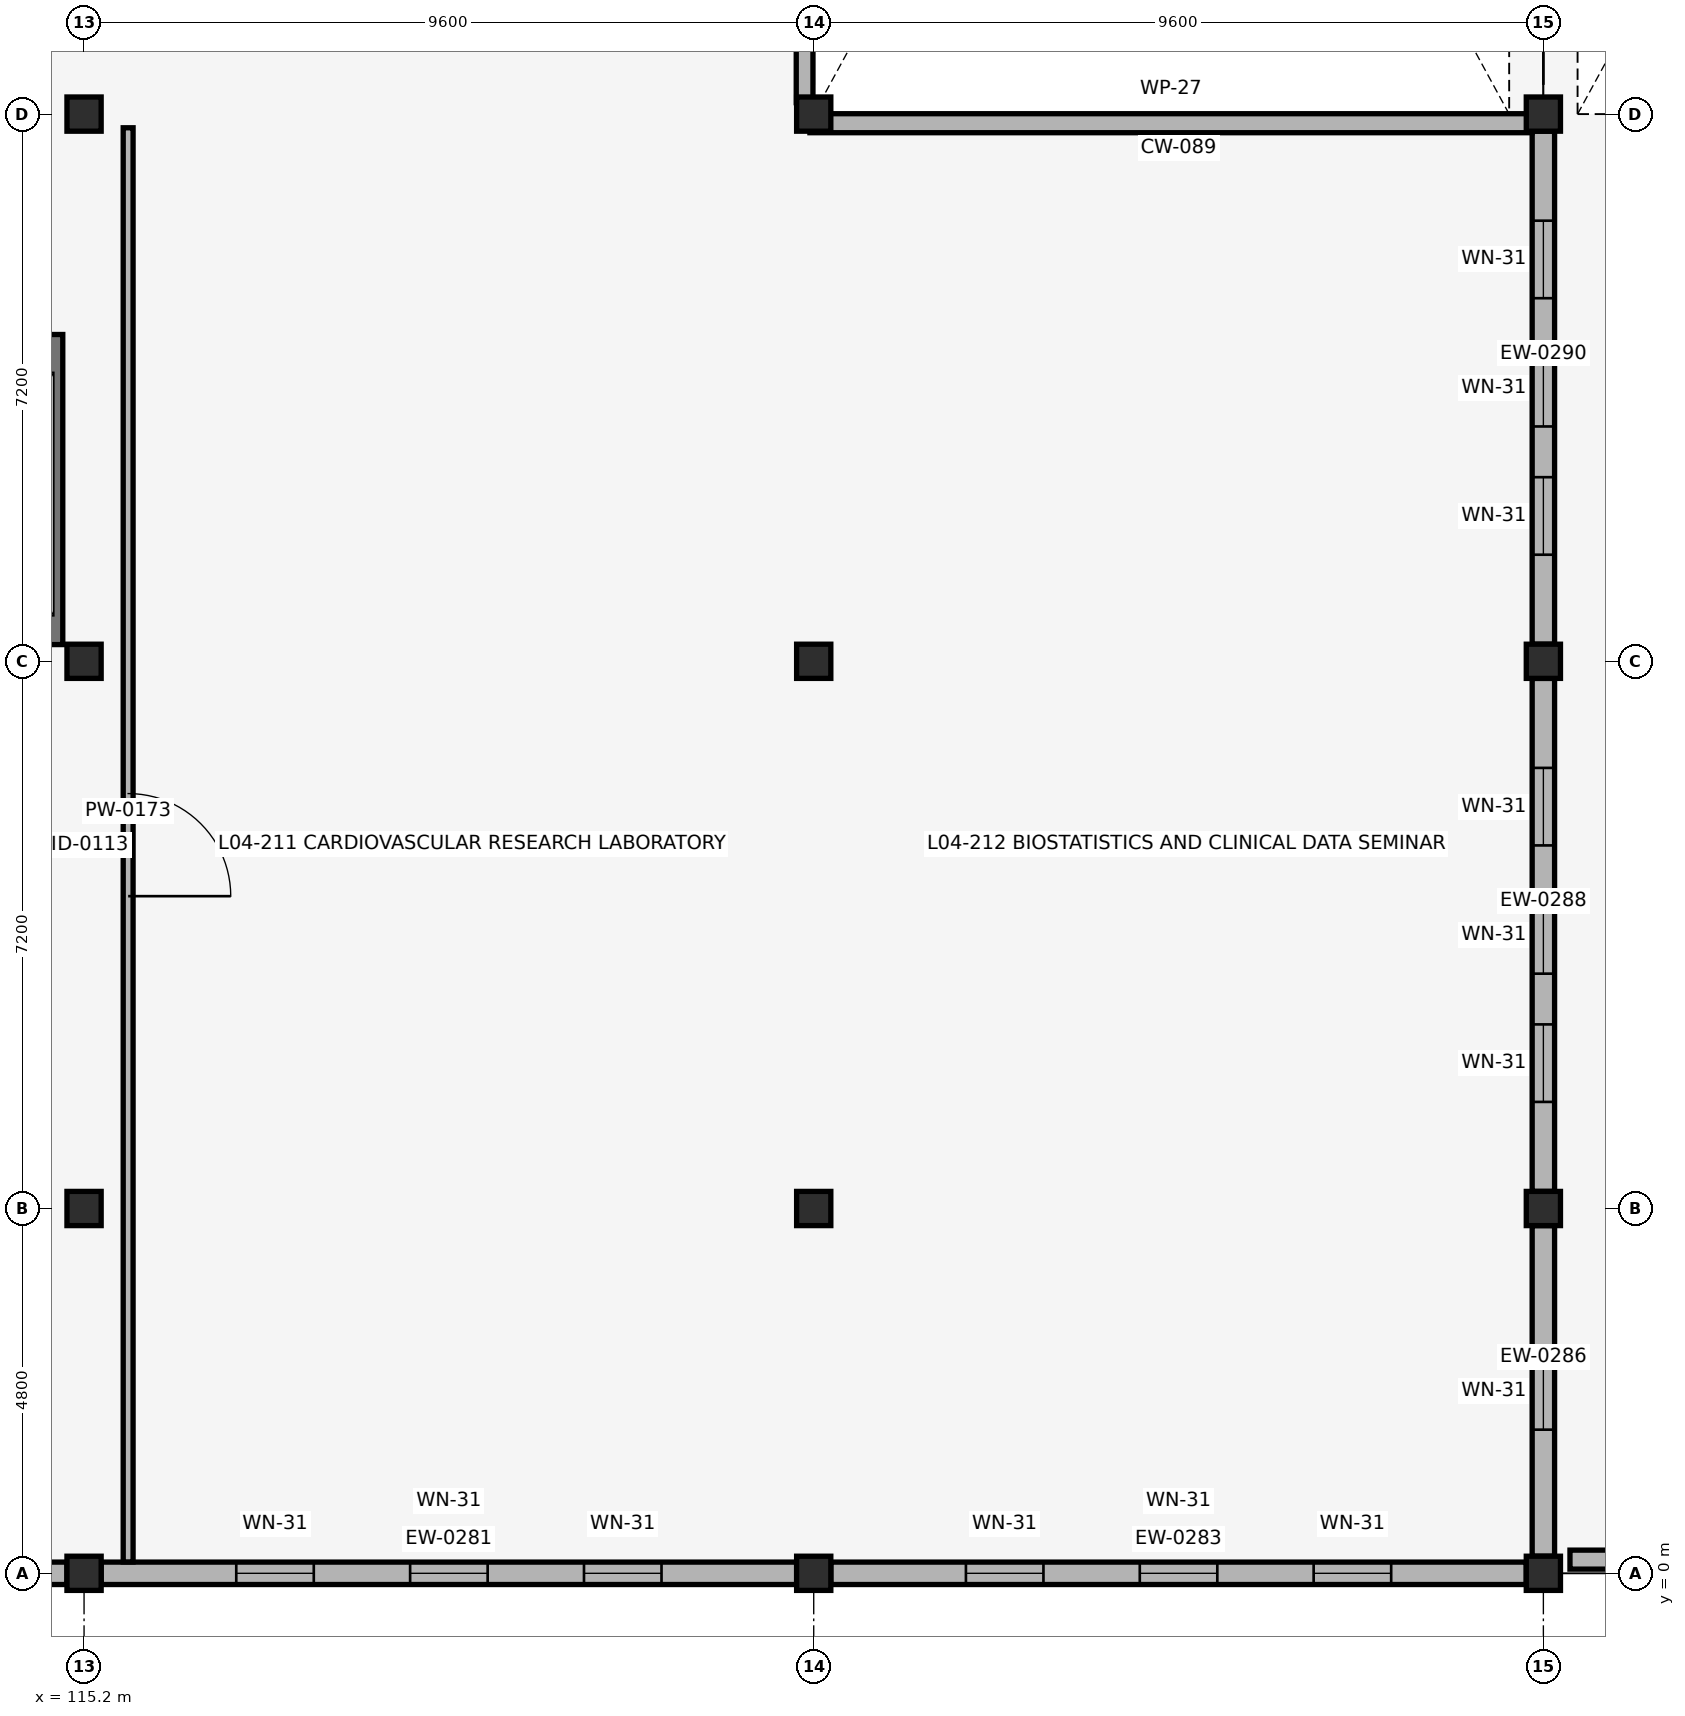
"""IFC4 building model, lengths in metres.
Left out: names, types, materials, properties, quantities, classifications, styles, units other than length and angle.
Written with IfcOpenShell. Run it as: python <this file> out.ifc"""

import sys

from ifc_helpers import new_model, si_unit, direction, frame, frame_2d, origin, origin_2d, place, context, subcontext, project, spatial, rectangle, extrude, element, fill, save


model = new_model("IFC4")
c1 = context("Model", 3, precision=1e-05, world=origin(), true_north=direction((0.0, 1.0)))
c2 = subcontext(c1, "Body", "Model", "MODEL_VIEW")
j1 = project(units=[si_unit("LENGTHUNIT", "METRE"), si_unit("PLANEANGLEUNIT", "RADIAN")], contexts=[c1])
p1 = place(None, origin())
s1 = spatial("IfcSite", under=j1, at=p1, CompositionType="ELEMENT")
p2 = place(p1, origin())
s2 = spatial("IfcBuilding", under=s1, at=p2, CompositionType="ELEMENT")
p3 = place(p2, frame((0.0, 0.0, 16.66)))
s3 = spatial("IfcBuildingStorey", under=s2, at=p3, CompositionType="ELEMENT", Elevation=16.66)
for number, where, z_axis, x_axis in (
    (1, (115.2, 0.0, 0.0), (0.0, 0.0, 1.0), (1.0, 0.0, 0.0)),
    (2, (115.2, 4.8, 0.0), (0.0, 0.0, 1.0), (1.0, 0.0, 0.0)),
    (3, (115.2, 12.0, 0.0), (0.0, 0.0, 1.0), (1.0, 0.0, 0.0)),
    (4, (115.2, 19.2, 0.0), (0.0, 0.0, 1.0), (1.0, 0.0, 0.0)),
    (5, (124.8, 0.0, 0.0), (0.0, 0.0, 1.0), (1.0, 0.0, 0.0)),
    (6, (124.8, 4.8, 0.0), (0.0, 0.0, 1.0), (1.0, 0.0, 0.0)),
    (7, (124.8, 12.0, 0.0), (0.0, 0.0, 1.0), (1.0, 0.0, 0.0)),
    (8, (124.8, 19.2, 0.0), (0.0, 0.0, 1.0), (1.0, 0.0, 0.0)),
    (9, (134.4, 0.0, 0.0), (0.0, 0.0, 1.0), (1.0, 0.0, 0.0)),
    (10, (134.4, 4.8, 0.0), (0.0, 0.0, 1.0), (1.0, 0.0, 0.0)),
    (11, (134.4, 12.0, 0.0), (0.0, 0.0, 1.0), (1.0, 0.0, 0.0)),
    (12, (134.4, 19.2, 0.0), (0.0, 0.0, 1.0), (1.0, 0.0, 0.0)),
):
    element("IfcColumn", number, at=place(p3, frame(where, z_axis=z_axis, x_axis=x_axis)), inside=s3, PredefinedType="COLUMN", context=c2, shape_type="SweptSolid", body=[
        extrude(rectangle(XDim=0.45, YDim=0.45, at=origin_2d()), origin(), (0.0, 0.0, 1.0), 4.08),
    ])
p4 = place(p3, frame((105.825, 0.0, 0.0), z_axis=(0.0, 0.0, 1.0), x_axis=(1.0, 0.0, 0.0)))
e13 = element("IfcWall", 13, at=p4, inside=s3, PredefinedType="SOLIDWALL", context=c2, shape_type="SweptSolid", body=[
    extrude(rectangle(XDim=9.15, YDim=0.295, at=frame_2d((4.575, 0.0))), origin(), (0.0, 0.0, 1.0), 3.06),
])
p5 = place(p4, frame((1.778, 0.0, 0.88)))
e14 = element("IfcOpeningElement", 14, at=p5, cuts=e13, PredefinedType="OPENING", context=c2, shape_type="SweptSolid", body=[
    extrude(rectangle(XDim=1.02, YDim=1.88, at=frame_2d((0.51, 0.94))), frame((0.0, 0.157, 0.0), z_axis=(0.0, -1.0, 0.0), x_axis=(1.0, 0.0, 0.0)), (0.0, 0.0, 1.0), 0.315),
])
p6 = place(p4, frame((4.065, 0.0, 0.88)))
e15 = element("IfcOpeningElement", 15, at=p6, cuts=e13, PredefinedType="OPENING", context=c2, shape_type="SweptSolid", body=[
    extrude(rectangle(XDim=1.02, YDim=1.88, at=frame_2d((0.51, 0.94))), frame((0.0, 0.157, 0.0), z_axis=(0.0, -1.0, 0.0), x_axis=(1.0, 0.0, 0.0)), (0.0, 0.0, 1.0), 0.315),
])
p7 = place(p4, frame((6.353, 0.0, 0.88)))
e16 = element("IfcOpeningElement", 16, at=p7, cuts=e13, PredefinedType="OPENING", context=c2, shape_type="SweptSolid", body=[
    extrude(rectangle(XDim=1.02, YDim=1.88, at=frame_2d((0.51, 0.94))), frame((0.0, 0.157, 0.0), z_axis=(0.0, -1.0, 0.0), x_axis=(1.0, 0.0, 0.0)), (0.0, 0.0, 1.0), 0.315),
])
p8 = place(p3, frame((115.425, 0.0, 0.0), z_axis=(0.0, 0.0, 1.0), x_axis=(1.0, 0.0, 0.0)))
e17 = element("IfcWall", 17, at=p8, inside=s3, PredefinedType="SOLIDWALL", context=c2, shape_type="SweptSolid", body=[
    extrude(rectangle(XDim=9.15, YDim=0.295, at=frame_2d((4.575, 0.0))), origin(), (0.0, 0.0, 1.0), 3.06),
])
p9 = place(p8, frame((1.778, 0.0, 0.88)))
e18 = element("IfcOpeningElement", 18, at=p9, cuts=e17, PredefinedType="OPENING", context=c2, shape_type="SweptSolid", body=[
    extrude(rectangle(XDim=1.02, YDim=1.88, at=frame_2d((0.51, 0.94))), frame((0.0, 0.157, 0.0), z_axis=(0.0, -1.0, 0.0), x_axis=(1.0, 0.0, 0.0)), (0.0, 0.0, 1.0), 0.315),
])
p10 = place(p8, frame((4.065, 0.0, 0.88)))
e19 = element("IfcOpeningElement", 19, at=p10, cuts=e17, PredefinedType="OPENING", context=c2, shape_type="SweptSolid", body=[
    extrude(rectangle(XDim=1.02, YDim=1.88, at=frame_2d((0.51, 0.94))), frame((0.0, 0.157, 0.0), z_axis=(0.0, -1.0, 0.0), x_axis=(1.0, 0.0, 0.0)), (0.0, 0.0, 1.0), 0.315),
])
p11 = place(p8, frame((6.353, 0.0, 0.88)))
e20 = element("IfcOpeningElement", 20, at=p11, cuts=e17, PredefinedType="OPENING", context=c2, shape_type="SweptSolid", body=[
    extrude(rectangle(XDim=1.02, YDim=1.88, at=frame_2d((0.51, 0.94))), frame((0.0, 0.157, 0.0), z_axis=(0.0, -1.0, 0.0), x_axis=(1.0, 0.0, 0.0)), (0.0, 0.0, 1.0), 0.315),
])
p12 = place(p3, frame((125.025, 0.0, 0.0), z_axis=(0.0, 0.0, 1.0), x_axis=(1.0, 0.0, 0.0)))
e21 = element("IfcWall", 21, at=p12, inside=s3, PredefinedType="SOLIDWALL", context=c2, shape_type="SweptSolid", body=[
    extrude(rectangle(XDim=9.15, YDim=0.295, at=frame_2d((4.575, 0.0))), origin(), (0.0, 0.0, 1.0), 3.06),
])
p13 = place(p12, frame((1.778, 0.0, 0.88)))
e22 = element("IfcOpeningElement", 22, at=p13, cuts=e21, PredefinedType="OPENING", context=c2, shape_type="SweptSolid", body=[
    extrude(rectangle(XDim=1.02, YDim=1.88, at=frame_2d((0.51, 0.94))), frame((0.0, 0.157, 0.0), z_axis=(0.0, -1.0, 0.0), x_axis=(1.0, 0.0, 0.0)), (0.0, 0.0, 1.0), 0.315),
])
p14 = place(p12, frame((4.065, 0.0, 0.88)))
e23 = element("IfcOpeningElement", 23, at=p14, cuts=e21, PredefinedType="OPENING", context=c2, shape_type="SweptSolid", body=[
    extrude(rectangle(XDim=1.02, YDim=1.88, at=frame_2d((0.51, 0.94))), frame((0.0, 0.157, 0.0), z_axis=(0.0, -1.0, 0.0), x_axis=(1.0, 0.0, 0.0)), (0.0, 0.0, 1.0), 0.315),
])
p15 = place(p12, frame((6.353, 0.0, 0.88)))
e24 = element("IfcOpeningElement", 24, at=p15, cuts=e21, PredefinedType="OPENING", context=c2, shape_type="SweptSolid", body=[
    extrude(rectangle(XDim=1.02, YDim=1.88, at=frame_2d((0.51, 0.94))), frame((0.0, 0.157, 0.0), z_axis=(0.0, -1.0, 0.0), x_axis=(1.0, 0.0, 0.0)), (0.0, 0.0, 1.0), 0.315),
])
p16 = place(p3, frame((134.4, 0.225, 0.0), z_axis=(0.0, 0.0, 1.0), x_axis=(0.0, 1.0, 0.0)))
e25 = element("IfcWall", 25, at=p16, inside=s3, PredefinedType="SOLIDWALL", context=c2, shape_type="SweptSolid", body=[
    extrude(rectangle(XDim=4.35, YDim=0.295, at=frame_2d((2.175, 0.0))), origin(), (0.0, 0.0, 1.0), 3.06),
])
p17 = place(p16, frame((1.665, 0.0, 0.88)))
e26 = element("IfcOpeningElement", 26, at=p17, cuts=e25, PredefinedType="OPENING", context=c2, shape_type="SweptSolid", body=[
    extrude(rectangle(XDim=1.02, YDim=1.88, at=frame_2d((0.51, 0.94))), frame((0.0, 0.157, 0.0), z_axis=(0.0, -1.0, 0.0), x_axis=(1.0, 0.0, 0.0)), (0.0, 0.0, 1.0), 0.315),
])
p18 = place(p3, frame((134.4, 5.025, 0.0), z_axis=(0.0, 0.0, 1.0), x_axis=(0.0, 1.0, 0.0)))
e27 = element("IfcWall", 27, at=p18, inside=s3, PredefinedType="SOLIDWALL", context=c2, shape_type="SweptSolid", body=[
    extrude(rectangle(XDim=6.75, YDim=0.295, at=frame_2d((3.375, 0.0))), origin(), (0.0, 0.0, 1.0), 3.06),
])
p19 = place(p18, frame((1.177, 0.0, 0.88)))
e28 = element("IfcOpeningElement", 28, at=p19, cuts=e27, PredefinedType="OPENING", context=c2, shape_type="SweptSolid", body=[
    extrude(rectangle(XDim=1.02, YDim=1.88, at=frame_2d((0.51, 0.94))), frame((0.0, 0.157, 0.0), z_axis=(0.0, -1.0, 0.0), x_axis=(1.0, 0.0, 0.0)), (0.0, 0.0, 1.0), 0.315),
])
p20 = place(p18, frame((2.865, 0.0, 0.88)))
e29 = element("IfcOpeningElement", 29, at=p20, cuts=e27, PredefinedType="OPENING", context=c2, shape_type="SweptSolid", body=[
    extrude(rectangle(XDim=1.02, YDim=1.88, at=frame_2d((0.51, 0.94))), frame((0.0, 0.157, 0.0), z_axis=(0.0, -1.0, 0.0), x_axis=(1.0, 0.0, 0.0)), (0.0, 0.0, 1.0), 0.315),
])
p21 = place(p18, frame((4.552, 0.0, 0.88)))
e30 = element("IfcOpeningElement", 30, at=p21, cuts=e27, PredefinedType="OPENING", context=c2, shape_type="SweptSolid", body=[
    extrude(rectangle(XDim=1.02, YDim=1.88, at=frame_2d((0.51, 0.94))), frame((0.0, 0.157, 0.0), z_axis=(0.0, -1.0, 0.0), x_axis=(1.0, 0.0, 0.0)), (0.0, 0.0, 1.0), 0.315),
])
p22 = place(p3, frame((134.4, 12.225, 0.0), z_axis=(0.0, 0.0, 1.0), x_axis=(0.0, 1.0, 0.0)))
e31 = element("IfcWall", 31, at=p22, inside=s3, PredefinedType="SOLIDWALL", context=c2, shape_type="SweptSolid", body=[
    extrude(rectangle(XDim=6.75, YDim=0.295, at=frame_2d((3.375, 0.0))), origin(), (0.0, 0.0, 1.0), 3.06),
])
p23 = place(p22, frame((1.177, 0.0, 0.88)))
e32 = element("IfcOpeningElement", 32, at=p23, cuts=e31, PredefinedType="OPENING", context=c2, shape_type="SweptSolid", body=[
    extrude(rectangle(XDim=1.02, YDim=1.88, at=frame_2d((0.51, 0.94))), frame((0.0, 0.157, 0.0), z_axis=(0.0, -1.0, 0.0), x_axis=(1.0, 0.0, 0.0)), (0.0, 0.0, 1.0), 0.315),
])
p24 = place(p22, frame((2.865, 0.0, 0.88)))
e33 = element("IfcOpeningElement", 33, at=p24, cuts=e31, PredefinedType="OPENING", context=c2, shape_type="SweptSolid", body=[
    extrude(rectangle(XDim=1.02, YDim=1.88, at=frame_2d((0.51, 0.94))), frame((0.0, 0.157, 0.0), z_axis=(0.0, -1.0, 0.0), x_axis=(1.0, 0.0, 0.0)), (0.0, 0.0, 1.0), 0.315),
])
p25 = place(p22, frame((4.552, 0.0, 0.88)))
e34 = element("IfcOpeningElement", 34, at=p25, cuts=e31, PredefinedType="OPENING", context=c2, shape_type="SweptSolid", body=[
    extrude(rectangle(XDim=1.02, YDim=1.88, at=frame_2d((0.51, 0.94))), frame((0.0, 0.157, 0.0), z_axis=(0.0, -1.0, 0.0), x_axis=(1.0, 0.0, 0.0)), (0.0, 0.0, 1.0), 0.315),
])
p26 = place(p3, frame((134.75, 0.18, 0.0), z_axis=(0.0, 0.0, 1.0), x_axis=(1.0, 0.0, 0.0)))
e35 = element("IfcWall", 35, at=p26, inside=s3, PredefinedType="PARAPET", context=c2, shape_type="SweptSolid", body=[
    extrude(rectangle(XDim=18.5, YDim=0.25, at=frame_2d((9.25, 0.0))), origin(), (0.0, 0.0, 1.0), 1.12),
])
p27 = place(p3, frame((124.68, 19.35, 0.0), z_axis=(0.0, 0.0, 1.0), x_axis=(0.0, 1.0, 0.0)))
e36 = element("IfcWall", 36, at=p27, inside=s3, PredefinedType="PARAPET", context=c2, shape_type="SweptSolid", body=[
    extrude(rectangle(XDim=16.6, YDim=0.22, at=frame_2d((8.3, 0.0))), origin(), (0.0, 0.0, 1.0), 1.12),
])
p28 = place(p3, frame((124.75, 19.08, 0.0), z_axis=(0.0, 0.0, 1.0), x_axis=(1.0, 0.0, 0.0)))
e37 = element("IfcWall", 37, at=p28, inside=s3, PredefinedType="PARAPET", context=c2, shape_type="SweptSolid", body=[
    extrude(rectangle(XDim=9.5, YDim=0.25, at=frame_2d((4.75, 0.0))), origin(), (0.0, 0.0, 1.0), 1.12),
])
p29 = place(p3, frame((114.78, 12.22, 0.0), z_axis=(0.0, 0.0, 1.0), x_axis=(0.0, 1.0, 0.0)))
e38 = element("IfcWall", 38, at=p29, inside=s3, PredefinedType="SHEAR", context=c2, shape_type="SweptSolid", body=[
    extrude(rectangle(XDim=4.08, YDim=0.28, at=frame_2d((2.04, 0.0))), origin(), (0.0, 0.0, 1.0), 3.78),
])
p30 = place(p3, frame((115.78, 0.149, 0.0), z_axis=(0.0, 0.0, 1.0), x_axis=(0.0, 1.0, 0.0)))
e39 = element("IfcWall", 39, at=p30, inside=s3, PredefinedType="PARTITIONING", context=c2, shape_type="SweptSolid", body=[
    extrude(rectangle(XDim=18.871, YDim=0.13, at=frame_2d((9.435, 0.0))), origin(), (0.0, 0.0, 1.0), 3.09),
])
p31 = place(p30, frame((8.76, 0.0, 0.0)))
e40 = element("IfcOpeningElement", 40, at=p31, cuts=e39, PredefinedType="OPENING", context=c2, shape_type="SweptSolid", body=[
    extrude(rectangle(XDim=1.35, YDim=2.12, at=frame_2d((0.675, 1.06))), frame((0.0, 0.075, 0.0), z_axis=(0.0, -1.0, 0.0), x_axis=(1.0, 0.0, 0.0)), (0.0, 0.0, 1.0), 0.15),
])
p32 = place(p9, origin())
e41 = element("IfcWindow", 41, at=p32, inside=s3, PartitioningType="SINGLE_PANEL", PredefinedType="WINDOW", context=c2, shape_type="SweptSolid", body=[
    extrude(rectangle(XDim=1.02, YDim=1.88, at=frame_2d((0.51, 0.94))), frame((0.0, 0.03, 0.0), z_axis=(0.0, -1.0, 0.0), x_axis=(1.0, 0.0, 0.0)), (0.0, 0.0, 1.0), 0.06),
])
fill(e18, e41)
p33 = place(p10, origin())
e42 = element("IfcWindow", 42, at=p33, inside=s3, PartitioningType="SINGLE_PANEL", PredefinedType="WINDOW", context=c2, shape_type="SweptSolid", body=[
    extrude(rectangle(XDim=1.02, YDim=1.88, at=frame_2d((0.51, 0.94))), frame((0.0, 0.03, 0.0), z_axis=(0.0, -1.0, 0.0), x_axis=(1.0, 0.0, 0.0)), (0.0, 0.0, 1.0), 0.06),
])
fill(e19, e42)
p34 = place(p11, origin())
e43 = element("IfcWindow", 43, at=p34, inside=s3, PartitioningType="SINGLE_PANEL", PredefinedType="WINDOW", context=c2, shape_type="SweptSolid", body=[
    extrude(rectangle(XDim=1.02, YDim=1.88, at=frame_2d((0.51, 0.94))), frame((0.0, 0.03, 0.0), z_axis=(0.0, -1.0, 0.0), x_axis=(1.0, 0.0, 0.0)), (0.0, 0.0, 1.0), 0.06),
])
fill(e20, e43)
p35 = place(p13, origin())
e44 = element("IfcWindow", 44, at=p35, inside=s3, PartitioningType="SINGLE_PANEL", PredefinedType="WINDOW", context=c2, shape_type="SweptSolid", body=[
    extrude(rectangle(XDim=1.02, YDim=1.88, at=frame_2d((0.51, 0.94))), frame((0.0, 0.03, 0.0), z_axis=(0.0, -1.0, 0.0), x_axis=(1.0, 0.0, 0.0)), (0.0, 0.0, 1.0), 0.06),
])
fill(e22, e44)
p36 = place(p14, origin())
e45 = element("IfcWindow", 45, at=p36, inside=s3, PartitioningType="SINGLE_PANEL", PredefinedType="WINDOW", context=c2, shape_type="SweptSolid", body=[
    extrude(rectangle(XDim=1.02, YDim=1.88, at=frame_2d((0.51, 0.94))), frame((0.0, 0.03, 0.0), z_axis=(0.0, -1.0, 0.0), x_axis=(1.0, 0.0, 0.0)), (0.0, 0.0, 1.0), 0.06),
])
fill(e23, e45)
p37 = place(p15, origin())
e46 = element("IfcWindow", 46, at=p37, inside=s3, PartitioningType="SINGLE_PANEL", PredefinedType="WINDOW", context=c2, shape_type="SweptSolid", body=[
    extrude(rectangle(XDim=1.02, YDim=1.88, at=frame_2d((0.51, 0.94))), frame((0.0, 0.03, 0.0), z_axis=(0.0, -1.0, 0.0), x_axis=(1.0, 0.0, 0.0)), (0.0, 0.0, 1.0), 0.06),
])
fill(e24, e46)
p38 = place(p17, origin())
e47 = element("IfcWindow", 47, at=p38, inside=s3, PartitioningType="SINGLE_PANEL", PredefinedType="WINDOW", context=c2, shape_type="SweptSolid", body=[
    extrude(rectangle(XDim=1.02, YDim=1.88, at=frame_2d((0.51, 0.94))), frame((0.0, 0.03, 0.0), z_axis=(0.0, -1.0, 0.0), x_axis=(1.0, 0.0, 0.0)), (0.0, 0.0, 1.0), 0.06),
])
fill(e26, e47)
p39 = place(p19, origin())
e48 = element("IfcWindow", 48, at=p39, inside=s3, PartitioningType="SINGLE_PANEL", PredefinedType="WINDOW", context=c2, shape_type="SweptSolid", body=[
    extrude(rectangle(XDim=1.02, YDim=1.88, at=frame_2d((0.51, 0.94))), frame((0.0, 0.03, 0.0), z_axis=(0.0, -1.0, 0.0), x_axis=(1.0, 0.0, 0.0)), (0.0, 0.0, 1.0), 0.06),
])
fill(e28, e48)
p40 = place(p20, origin())
e49 = element("IfcWindow", 49, at=p40, inside=s3, PartitioningType="SINGLE_PANEL", PredefinedType="WINDOW", context=c2, shape_type="SweptSolid", body=[
    extrude(rectangle(XDim=1.02, YDim=1.88, at=frame_2d((0.51, 0.94))), frame((0.0, 0.03, 0.0), z_axis=(0.0, -1.0, 0.0), x_axis=(1.0, 0.0, 0.0)), (0.0, 0.0, 1.0), 0.06),
])
fill(e29, e49)
p41 = place(p21, origin())
e50 = element("IfcWindow", 50, at=p41, inside=s3, PartitioningType="SINGLE_PANEL", PredefinedType="WINDOW", context=c2, shape_type="SweptSolid", body=[
    extrude(rectangle(XDim=1.02, YDim=1.88, at=frame_2d((0.51, 0.94))), frame((0.0, 0.03, 0.0), z_axis=(0.0, -1.0, 0.0), x_axis=(1.0, 0.0, 0.0)), (0.0, 0.0, 1.0), 0.06),
])
fill(e30, e50)
p42 = place(p23, origin())
e51 = element("IfcWindow", 51, at=p42, inside=s3, PartitioningType="SINGLE_PANEL", PredefinedType="WINDOW", context=c2, shape_type="SweptSolid", body=[
    extrude(rectangle(XDim=1.02, YDim=1.88, at=frame_2d((0.51, 0.94))), frame((0.0, 0.03, 0.0), z_axis=(0.0, -1.0, 0.0), x_axis=(1.0, 0.0, 0.0)), (0.0, 0.0, 1.0), 0.06),
])
fill(e32, e51)
p43 = place(p24, origin())
e52 = element("IfcWindow", 52, at=p43, inside=s3, PartitioningType="SINGLE_PANEL", PredefinedType="WINDOW", context=c2, shape_type="SweptSolid", body=[
    extrude(rectangle(XDim=1.02, YDim=1.88, at=frame_2d((0.51, 0.94))), frame((0.0, 0.03, 0.0), z_axis=(0.0, -1.0, 0.0), x_axis=(1.0, 0.0, 0.0)), (0.0, 0.0, 1.0), 0.06),
])
fill(e33, e52)
p44 = place(p25, origin())
e53 = element("IfcWindow", 53, at=p44, inside=s3, PartitioningType="SINGLE_PANEL", PredefinedType="WINDOW", context=c2, shape_type="SweptSolid", body=[
    extrude(rectangle(XDim=1.02, YDim=1.88, at=frame_2d((0.51, 0.94))), frame((0.0, 0.03, 0.0), z_axis=(0.0, -1.0, 0.0), x_axis=(1.0, 0.0, 0.0)), (0.0, 0.0, 1.0), 0.06),
])
fill(e34, e53)
p45 = place(p31, origin())
e54 = element("IfcDoor", 54, at=p45, inside=s3, OperationType="SINGLE_SWING_RIGHT", PredefinedType="DOOR", context=c2, shape_type="SweptSolid", body=[
    extrude(rectangle(XDim=1.35, YDim=2.12, at=frame_2d((0.675, 1.06))), frame((0.0, 0.025, 0.0), z_axis=(0.0, -1.0, 0.0), x_axis=(1.0, 0.0, 0.0)), (0.0, 0.0, 1.0), 0.05),
])
fill(e40, e54)
save(model, sys.argv[1])
